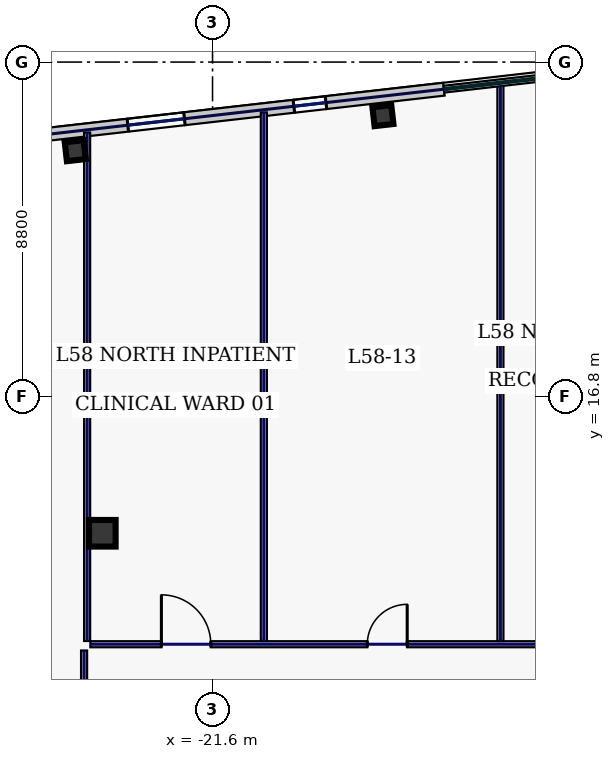
"""IFC4 building model, lengths in metres.
Left out: names, types, materials, properties, quantities, classifications, styles, units other than length and angle.
Written with IfcOpenShell. Run it as: python <this file> out.ifc"""

import sys

from ifc_helpers import new_model, si_unit, direction, frame, frame_2d, origin, origin_2d, place, context, subcontext, project, spatial, rectangle, hollow_rectangle, extrude, element, fill, save


model = new_model("IFC4")
c1 = context("Model", 3, precision=1e-05, world=origin(), true_north=direction((0.0, 1.0)))
c2 = subcontext(c1, "Body", "Model", "MODEL_VIEW")
j1 = project(units=[si_unit("LENGTHUNIT", "METRE"), si_unit("PLANEANGLEUNIT", "RADIAN")], contexts=[c1])
p1 = place(None, origin())
s1 = spatial("IfcSite", under=j1, at=p1, CompositionType="ELEMENT")
p2 = place(p1, origin())
s2 = spatial("IfcBuilding", under=s1, at=p2, CompositionType="ELEMENT")
p3 = place(p2, frame((0.0, 0.0, 251.0)))
s3 = spatial("IfcBuildingStorey", under=s2, at=p3, CompositionType="ELEMENT", Elevation=251.0)
p4 = place(p3, frame((-24.5, 13.2, 0.0), z_axis=(0.0, 0.0, 1.0), x_axis=(1.0, 0.0, 0.0)))
e1 = element("IfcColumn", 1, at=p4, inside=s3, PredefinedType="COLUMN", context=c2, shape_type="SweptSolid", body=[
    extrude(hollow_rectangle(XDim=0.7, YDim=0.7, WallThickness=0.032, at=origin_2d()), origin(), (0.0, 0.0, 1.0), 3.74),
])
for number, where, z_axis, x_axis in (
    (2, (-17.116, 24.19, 0.0), (0.0, 0.0, 1.0), (0.994, 0.113, 0.0)),
    (3, (-25.212, 23.268, 0.0), (0.0, 0.0, 1.0), (0.994, 0.113, 0.0)),
):
    element("IfcColumn", number, at=place(p3, frame(where, z_axis=z_axis, x_axis=x_axis)), inside=s3, PredefinedType="COLUMN", context=c2, shape_type="SweptSolid", body=[
        extrude(hollow_rectangle(XDim=0.5, YDim=0.5, WallThickness=0.025, at=origin_2d()), origin(), (0.0, 0.0, 1.0), 3.74),
    ])
p5 = place(p3, frame((-15.51, 24.886, 0.0), z_axis=(0.0, 0.0, 1.0), x_axis=(-0.993572271362, -0.113199565282, 0.0)))
e4 = element("IfcWall", 4, at=p5, inside=s3, PredefinedType="STANDARD", context=c2, shape_type="SweptSolid", body=[
    extrude(rectangle(XDim=18.651, YDim=0.34, at=frame_2d((9.326, 0.0))), origin(), (0.0, 0.0, 1.0), 3.74),
])
p6 = place(p5, frame((15.021, 0.0, 0.83)))
e5 = element("IfcOpeningElement", 5, at=p6, cuts=e4, PredefinedType="OPENING", context=c2, shape_type="SweptSolid", body=[
    extrude(rectangle(XDim=1.5, YDim=2.0, at=frame_2d((0.75, 1.0))), frame((0.0, 0.18, 0.0), z_axis=(0.0, -1.0, 0.0), x_axis=(1.0, 0.0, 0.0)), (0.0, 0.0, 1.0), 0.36),
])
p7 = place(p5, frame((11.273, 0.0, 0.83)))
e6 = element("IfcOpeningElement", 6, at=p7, cuts=e4, PredefinedType="OPENING", context=c2, shape_type="SweptSolid", body=[
    extrude(rectangle(XDim=1.5, YDim=2.0, at=frame_2d((0.75, 1.0))), frame((0.0, 0.18, 0.0), z_axis=(0.0, -1.0, 0.0), x_axis=(1.0, 0.0, 0.0)), (0.0, 0.0, 1.0), 0.36),
])
p8 = place(p5, frame((6.873, 0.0, 0.83)))
e7 = element("IfcOpeningElement", 7, at=p8, cuts=e4, PredefinedType="OPENING", context=c2, shape_type="SweptSolid", body=[
    extrude(rectangle(XDim=1.5, YDim=2.0, at=frame_2d((0.75, 1.0))), frame((0.0, 0.18, 0.0), z_axis=(0.0, -1.0, 0.0), x_axis=(1.0, 0.0, 0.0)), (0.0, 0.0, 1.0), 0.36),
])
p9 = place(p5, frame((3.125, 0.0, 0.83)))
e8 = element("IfcOpeningElement", 8, at=p9, cuts=e4, PredefinedType="OPENING", context=c2, shape_type="SweptSolid", body=[
    extrude(rectangle(XDim=0.85, YDim=1.85, at=frame_2d((0.425, 0.925))), frame((0.0, 0.18, 0.0), z_axis=(0.0, -1.0, 0.0), x_axis=(1.0, 0.0, 0.0)), (0.0, 0.0, 1.0), 0.36),
])
p10 = place(p3, frame((-24.98, -10.015, 0.0), z_axis=(0.0, 0.0, 1.0), x_axis=(0.0, 1.0, 0.0)))
e9 = element("IfcWall", 9, at=p10, inside=s3, PredefinedType="PARTITIONING", context=c2, shape_type="SweptSolid", body=[
    extrude(rectangle(XDim=20.13, YDim=0.16, at=frame_2d((10.065, 0.0))), origin(), (0.0, 0.0, 1.0), 3.74),
])
p11 = place(p10, frame((2.169, 0.0, 0.0)))
e10 = element("IfcOpeningElement", 10, at=p11, cuts=e9, PredefinedType="OPENING", context=c2, shape_type="SweptSolid", body=[
    extrude(rectangle(XDim=0.95, YDim=2.2, at=frame_2d((0.475, 1.1))), frame((0.0, 0.09, 0.0), z_axis=(0.0, -1.0, 0.0), x_axis=(1.0, 0.0, 0.0)), (0.0, 0.0, 1.0), 0.18),
])
p12 = place(p10, frame((7.025, 0.0, 0.0)))
e11 = element("IfcOpeningElement", 11, at=p12, cuts=e9, PredefinedType="OPENING", context=c2, shape_type="SweptSolid", body=[
    extrude(rectangle(XDim=0.95, YDim=2.2, at=frame_2d((0.475, 1.1))), frame((0.0, 0.09, 0.0), z_axis=(0.0, -1.0, 0.0), x_axis=(1.0, 0.0, 0.0)), (0.0, 0.0, 1.0), 0.18),
])
p13 = place(p10, frame((12.225, 0.0, 0.0)))
e12 = element("IfcOpeningElement", 12, at=p13, cuts=e9, PredefinedType="OPENING", context=c2, shape_type="SweptSolid", body=[
    extrude(rectangle(XDim=0.95, YDim=2.2, at=frame_2d((0.475, 1.1))), frame((0.0, 0.09, 0.0), z_axis=(0.0, -1.0, 0.0), x_axis=(1.0, 0.0, 0.0)), (0.0, 0.0, 1.0), 0.18),
])
p14 = place(p10, frame((17.131, 0.0, 0.0)))
e13 = element("IfcOpeningElement", 13, at=p14, cuts=e9, PredefinedType="OPENING", context=c2, shape_type="SweptSolid", body=[
    extrude(rectangle(XDim=0.95, YDim=2.2, at=frame_2d((0.475, 1.1))), frame((0.0, 0.09, 0.0), z_axis=(0.0, -1.0, 0.0), x_axis=(1.0, 0.0, 0.0)), (0.0, 0.0, 1.0), 0.18),
])
p15 = place(p3, frame((-24.815, 10.28, 0.0), z_axis=(0.0, 0.0, 1.0), x_axis=(1.0, 0.0, 0.0)))
e14 = element("IfcWall", 14, at=p15, inside=s3, PredefinedType="PARTITIONING", context=c2, shape_type="SweptSolid", body=[
    extrude(rectangle(XDim=49.63, YDim=0.16, at=frame_2d((24.815, 0.0))), origin(), (0.0, 0.0, 1.0), 3.74),
])
p16 = place(p15, frame((1.869, 0.0, 0.0)))
e15 = element("IfcOpeningElement", 15, at=p16, cuts=e14, PredefinedType="OPENING", context=c2, shape_type="SweptSolid", body=[
    extrude(rectangle(XDim=1.3, YDim=2.2, at=frame_2d((0.65, 1.1))), frame((0.0, 0.09, 0.0), z_axis=(0.0, -1.0, 0.0), x_axis=(1.0, 0.0, 0.0)), (0.0, 0.0, 1.0), 0.18),
])
p17 = place(p15, frame((7.288, 0.0, 0.0)))
e16 = element("IfcOpeningElement", 16, at=p17, cuts=e14, PredefinedType="OPENING", context=c2, shape_type="SweptSolid", body=[
    extrude(rectangle(XDim=1.05, YDim=2.2, at=frame_2d((0.525, 1.1))), frame((0.0, 0.09, 0.0), z_axis=(0.0, -1.0, 0.0), x_axis=(1.0, 0.0, 0.0)), (0.0, 0.0, 1.0), 0.18),
])
p18 = place(p15, frame((12.887, 0.0, 0.0)))
e17 = element("IfcOpeningElement", 17, at=p18, cuts=e14, PredefinedType="OPENING", context=c2, shape_type="SweptSolid", body=[
    extrude(rectangle(XDim=1.3, YDim=2.2, at=frame_2d((0.65, 1.1))), frame((0.0, 0.09, 0.0), z_axis=(0.0, -1.0, 0.0), x_axis=(1.0, 0.0, 0.0)), (0.0, 0.0, 1.0), 0.18),
])
p19 = place(p15, frame((19.53, 0.0, 0.0)))
e18 = element("IfcOpeningElement", 18, at=p19, cuts=e14, PredefinedType="OPENING", context=c2, shape_type="SweptSolid", body=[
    extrude(rectangle(XDim=0.95, YDim=2.2, at=frame_2d((0.475, 1.1))), frame((0.0, 0.09, 0.0), z_axis=(0.0, -1.0, 0.0), x_axis=(1.0, 0.0, 0.0)), (0.0, 0.0, 1.0), 0.18),
])
p20 = place(p15, frame((27.383, 0.0, 0.0)))
e19 = element("IfcOpeningElement", 19, at=p20, cuts=e14, PredefinedType="OPENING", context=c2, shape_type="SweptSolid", body=[
    extrude(rectangle(XDim=0.95, YDim=2.2, at=frame_2d((0.475, 1.1))), frame((0.0, 0.09, 0.0), z_axis=(0.0, -1.0, 0.0), x_axis=(1.0, 0.0, 0.0)), (0.0, 0.0, 1.0), 0.18),
])
p21 = place(p15, frame((34.853, 0.0, 0.0)))
e20 = element("IfcOpeningElement", 20, at=p21, cuts=e14, PredefinedType="OPENING", context=c2, shape_type="SweptSolid", body=[
    extrude(rectangle(XDim=1.3, YDim=2.2, at=frame_2d((0.65, 1.1))), frame((0.0, 0.09, 0.0), z_axis=(0.0, -1.0, 0.0), x_axis=(1.0, 0.0, 0.0)), (0.0, 0.0, 1.0), 0.18),
])
p22 = place(p15, frame((41.475, 0.0, 0.0)))
e21 = element("IfcOpeningElement", 21, at=p22, cuts=e14, PredefinedType="OPENING", context=c2, shape_type="SweptSolid", body=[
    extrude(rectangle(XDim=1.3, YDim=2.2, at=frame_2d((0.65, 1.1))), frame((0.0, 0.09, 0.0), z_axis=(0.0, -1.0, 0.0), x_axis=(1.0, 0.0, 0.0)), (0.0, 0.0, 1.0), 0.18),
])
p23 = place(p15, frame((46.806, 0.0, 0.0)))
e22 = element("IfcOpeningElement", 22, at=p23, cuts=e14, PredefinedType="OPENING", context=c2, shape_type="SweptSolid", body=[
    extrude(rectangle(XDim=0.95, YDim=2.2, at=frame_2d((0.475, 1.1))), frame((0.0, 0.09, 0.0), z_axis=(0.0, -1.0, 0.0), x_axis=(1.0, 0.0, 0.0)), (0.0, 0.0, 1.0), 0.18),
])
p24 = place(p3, frame((-24.9, 10.365, 0.0), z_axis=(0.0, 0.0, 1.0), x_axis=(0.0, 1.0, 0.0)))
e23 = element("IfcWall", 23, at=p24, inside=s3, PredefinedType="PARTITIONING", context=c2, shape_type="SweptSolid", body=[
    extrude(rectangle(XDim=13.381, YDim=0.16, at=frame_2d((6.691, 0.0))), origin(), (0.0, 0.0, 1.0), 3.285),
])
p25 = place(p3, frame((-20.25, 10.365, 0.0), z_axis=(0.0, 0.0, 1.0), x_axis=(0.0, 1.0, 0.0)))
e24 = element("IfcWall", 24, at=p25, inside=s3, PredefinedType="PARTITIONING", context=c2, shape_type="SweptSolid", body=[
    extrude(rectangle(XDim=13.911, YDim=0.16, at=frame_2d((6.956, 0.0))), origin(), (0.0, 0.0, 1.0), 3.74),
])
p26 = place(p3, frame((-14.025, 10.365, 0.0), z_axis=(0.0, 0.0, 1.0), x_axis=(0.0, 1.0, 0.0)))
e25 = element("IfcWall", 25, at=p26, inside=s3, PredefinedType="PARTITIONING", context=c2, shape_type="SweptSolid", body=[
    extrude(rectangle(XDim=14.62, YDim=0.16, at=frame_2d((7.31, 0.0))), origin(), (0.0, 0.0, 1.0), 3.74),
])
p27 = place(p8, origin())
e26 = element("IfcWindow", 26, at=p27, inside=s3, PartitioningType="SINGLE_PANEL", PredefinedType="WINDOW", context=c2, shape_type="SweptSolid", body=[
    extrude(rectangle(XDim=1.5, YDim=2.0, at=frame_2d((0.75, 1.0))), frame((0.0, 0.03, 0.0), z_axis=(0.0, -1.0, 0.0), x_axis=(1.0, 0.0, 0.0)), (0.0, 0.0, 1.0), 0.06),
])
fill(e7, e26)
p28 = place(p9, origin())
e27 = element("IfcWindow", 27, at=p28, inside=s3, PartitioningType="SINGLE_PANEL", PredefinedType="WINDOW", context=c2, shape_type="SweptSolid", body=[
    extrude(rectangle(XDim=0.85, YDim=1.85, at=frame_2d((0.425, 0.925))), frame((0.0, 0.03, 0.0), z_axis=(0.0, -1.0, 0.0), x_axis=(1.0, 0.0, 0.0)), (0.0, 0.0, 1.0), 0.06),
])
fill(e8, e27)
p29 = place(p16, origin())
e28 = element("IfcDoor", 28, at=p29, inside=s3, OperationType="SINGLE_SWING_LEFT", PredefinedType="DOOR", context=c2, shape_type="SweptSolid", body=[
    extrude(rectangle(XDim=1.3, YDim=2.2, at=frame_2d((0.65, 1.1))), frame((0.0, 0.025, 0.0), z_axis=(0.0, -1.0, 0.0), x_axis=(1.0, 0.0, 0.0)), (0.0, 0.0, 1.0), 0.05),
])
fill(e15, e28)
p30 = place(p17, origin())
e29 = element("IfcDoor", 29, at=p30, inside=s3, OperationType="SINGLE_SWING_RIGHT", PredefinedType="DOOR", context=c2, shape_type="SweptSolid", body=[
    extrude(rectangle(XDim=1.05, YDim=2.2, at=frame_2d((0.525, 1.1))), frame((0.0, 0.025, 0.0), z_axis=(0.0, -1.0, 0.0), x_axis=(1.0, 0.0, 0.0)), (0.0, 0.0, 1.0), 0.05),
])
fill(e16, e29)
save(model, sys.argv[1])
